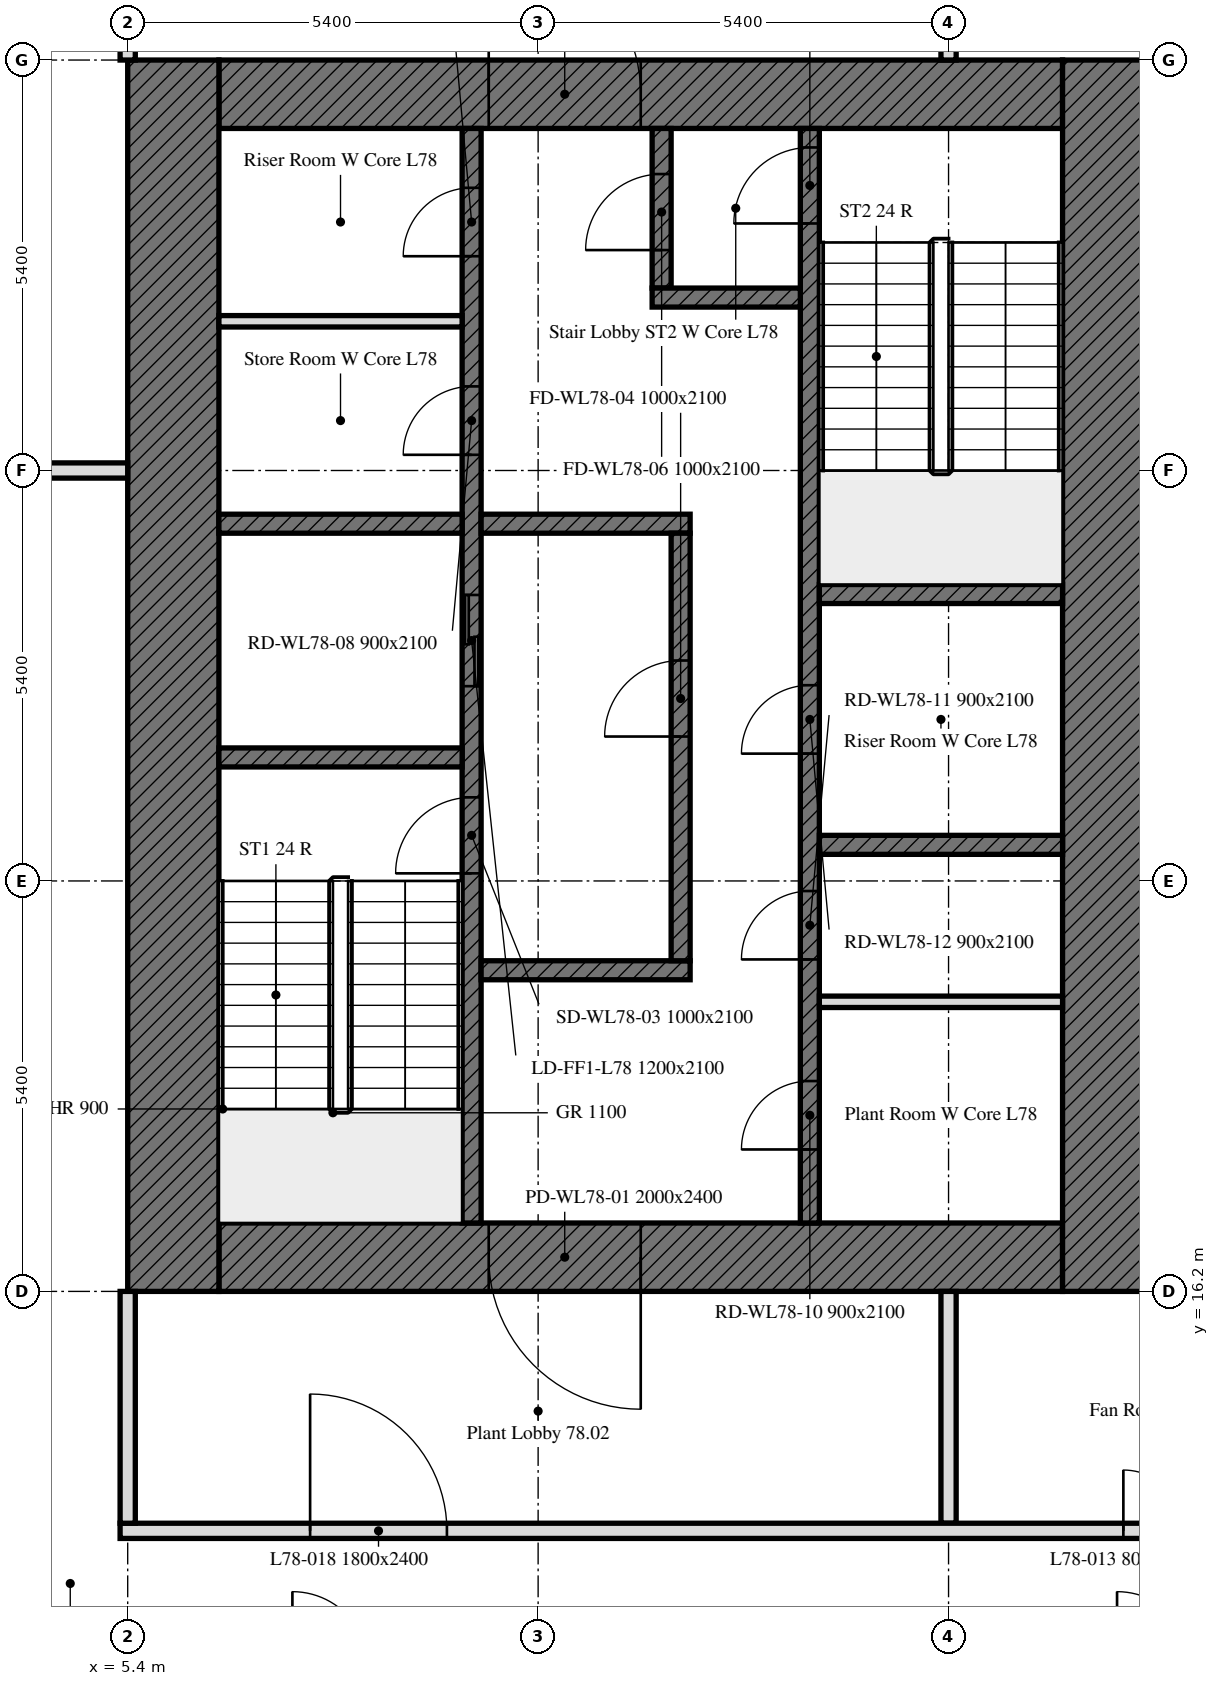
"""IFC4 building model, lengths in metres.
Left out: names, types, materials, properties, quantities, classifications, styles, units other than length and angle.
Written with IfcOpenShell. Run it as: python <this file> out.ifc"""

import sys

from ifc_helpers import new_model, si_unit, direction, frame, frame_2d, origin, place, context, subcontext, project, spatial, rectangle, extrude, element, fill, save


model = new_model("IFC4")
c1 = context("Model", 3, precision=1e-05, world=origin(), true_north=direction((0.0, 1.0)))
c2 = subcontext(c1, "Body", "Model", "MODEL_VIEW")
j1 = project(units=[si_unit("LENGTHUNIT", "METRE"), si_unit("PLANEANGLEUNIT", "RADIAN")], contexts=[c1])
p1 = place(None, origin())
s1 = spatial("IfcSite", under=j1, at=p1, CompositionType="ELEMENT")
p2 = place(p1, origin())
s2 = spatial("IfcBuilding", under=s1, at=p2, CompositionType="ELEMENT")
p3 = place(p2, frame((0.0, 0.0, 312.7)))
s3 = spatial("IfcBuildingStorey", under=s2, at=p3, CompositionType="ELEMENT", Elevation=312.7)
p4 = place(p3, frame((17.7, 16.65, 0.0), z_axis=(0.0, 0.0, 1.0), x_axis=(-1.0, 0.0, 0.0)))
e1 = element("IfcWall", 1, at=p4, inside=s3, PredefinedType="SOLIDWALL", context=c2, shape_type="SweptSolid", body=[
    extrude(rectangle(XDim=11.1, YDim=0.9, at=frame_2d((5.55, 0.0))), origin(), (0.0, 0.0, 1.0), 4.2),
])
p5 = place(p4, frame((5.55, 0.0, 0.0)))
e2 = element("IfcOpeningElement", 2, at=p5, cuts=e1, PredefinedType="OPENING", context=c2, shape_type="SweptSolid", body=[
    extrude(rectangle(XDim=2.0, YDim=2.4, at=frame_2d((1.0, 1.2))), frame((0.0, 0.45, 0.0), z_axis=(0.0, -1.0, 0.0), x_axis=(1.0, 0.0, 0.0)), (0.0, 0.0, 1.0), 0.9),
])
p6 = place(p3, frame((6.6, 31.95, 0.0), z_axis=(0.0, 0.0, 1.0), x_axis=(1.0, 0.0, 0.0)))
e3 = element("IfcWall", 3, at=p6, inside=s3, PredefinedType="SOLIDWALL", context=c2, shape_type="SweptSolid", body=[
    extrude(rectangle(XDim=11.1, YDim=0.9, at=frame_2d((5.55, 0.0))), origin(), (0.0, 0.0, 1.0), 4.2),
])
p7 = place(p6, frame((3.55, 0.0, 0.0)))
e4 = element("IfcOpeningElement", 4, at=p7, cuts=e3, PredefinedType="OPENING", context=c2, shape_type="SweptSolid", body=[
    extrude(rectangle(XDim=2.0, YDim=2.4, at=frame_2d((1.0, 1.2))), frame((0.0, 0.45, 0.0), z_axis=(0.0, -1.0, 0.0), x_axis=(1.0, 0.0, 0.0)), (0.0, 0.0, 1.0), 0.9),
])
for number, where, z_axis, x_axis in (
    (5, (6.0, 16.2, 0.0), (0.0, 0.0, 1.0), (0.0, 1.0, 0.0)),
    (6, (18.3, 32.4, 0.0), (0.0, 0.0, 1.0), (0.0, -1.0, 0.0)),
):
    element("IfcWall", number, at=place(p3, frame(where, z_axis=z_axis, x_axis=x_axis)), inside=s3, PredefinedType="SOLIDWALL", context=c2, shape_type="SweptSolid", body=[
        extrude(rectangle(XDim=16.2, YDim=1.2, at=frame_2d((8.1, 0.0))), origin(), (0.0, 0.0, 1.0), 4.2),
    ])
p8 = place(p3, frame((9.925, 17.1, 0.0), z_axis=(0.0, 0.0, 1.0), x_axis=(0.0, 1.0, 0.0)))
e7 = element("IfcWall", 7, at=p8, inside=s3, PredefinedType="SOLIDWALL", context=c2, shape_type="SweptSolid", body=[
    extrude(rectangle(XDim=14.4, YDim=0.25, at=frame_2d((7.2, 0.0))), origin(), (0.0, 0.0, 1.0), 4.2),
])
p9 = place(p8, frame((4.6, 0.0, 0.0)))
e8 = element("IfcOpeningElement", 8, at=p9, cuts=e7, PredefinedType="OPENING", context=c2, shape_type="SweptSolid", body=[
    extrude(rectangle(XDim=1.0, YDim=2.1, at=frame_2d((0.5, 1.05))), frame((0.0, 0.125, 0.0), z_axis=(0.0, -1.0, 0.0), x_axis=(1.0, 0.0, 0.0)), (0.0, 0.0, 1.0), 0.25),
])
p10 = place(p8, frame((7.062, 0.0, 0.0)))
e9 = element("IfcOpeningElement", 9, at=p10, cuts=e7, PredefinedType="OPENING", context=c2, shape_type="SweptSolid", body=[
    extrude(rectangle(XDim=1.2, YDim=2.1, at=frame_2d((0.6, 1.05))), frame((0.0, 0.125, 0.0), z_axis=(0.0, -1.0, 0.0), x_axis=(1.0, 0.0, 0.0)), (0.0, 0.0, 1.0), 0.25),
])
p11 = place(p8, frame((10.106, 0.0, 0.0)))
e10 = element("IfcOpeningElement", 10, at=p11, cuts=e7, PredefinedType="OPENING", context=c2, shape_type="SweptSolid", body=[
    extrude(rectangle(XDim=0.9, YDim=2.1, at=frame_2d((0.45, 1.05))), frame((0.0, 0.125, 0.0), z_axis=(0.0, -1.0, 0.0), x_axis=(1.0, 0.0, 0.0)), (0.0, 0.0, 1.0), 0.25),
])
p12 = place(p8, frame((12.719, 0.0, 0.0)))
e11 = element("IfcOpeningElement", 11, at=p12, cuts=e7, PredefinedType="OPENING", context=c2, shape_type="SweptSolid", body=[
    extrude(rectangle(XDim=0.9, YDim=2.1, at=frame_2d((0.45, 1.05))), frame((0.0, 0.125, 0.0), z_axis=(0.0, -1.0, 0.0), x_axis=(1.0, 0.0, 0.0)), (0.0, 0.0, 1.0), 0.25),
])
p13 = place(p3, frame((14.375, 17.1, 0.0), z_axis=(0.0, 0.0, 1.0), x_axis=(0.0, 1.0, 0.0)))
e12 = element("IfcWall", 12, at=p13, inside=s3, PredefinedType="SOLIDWALL", context=c2, shape_type="SweptSolid", body=[
    extrude(rectangle(XDim=14.4, YDim=0.25, at=frame_2d((7.2, 0.0))), origin(), (0.0, 0.0, 1.0), 4.2),
])
p14 = place(p13, frame((13.15, 0.0, 0.0)))
e13 = element("IfcOpeningElement", 13, at=p14, cuts=e12, PredefinedType="OPENING", context=c2, shape_type="SweptSolid", body=[
    extrude(rectangle(XDim=1.0, YDim=2.1, at=frame_2d((0.5, 1.05))), frame((0.0, 0.125, 0.0), z_axis=(0.0, -1.0, 0.0), x_axis=(1.0, 0.0, 0.0)), (0.0, 0.0, 1.0), 0.25),
])
p15 = place(p13, frame((0.968, 0.0, 0.0)))
e14 = element("IfcOpeningElement", 14, at=p15, cuts=e12, PredefinedType="OPENING", context=c2, shape_type="SweptSolid", body=[
    extrude(rectangle(XDim=0.9, YDim=2.1, at=frame_2d((0.45, 1.05))), frame((0.0, 0.125, 0.0), z_axis=(0.0, -1.0, 0.0), x_axis=(1.0, 0.0, 0.0)), (0.0, 0.0, 1.0), 0.25),
])
p16 = place(p13, frame((3.468, 0.0, 0.0)))
e15 = element("IfcOpeningElement", 15, at=p16, cuts=e12, PredefinedType="OPENING", context=c2, shape_type="SweptSolid", body=[
    extrude(rectangle(XDim=0.9, YDim=2.1, at=frame_2d((0.45, 1.05))), frame((0.0, 0.125, 0.0), z_axis=(0.0, -1.0, 0.0), x_axis=(1.0, 0.0, 0.0)), (0.0, 0.0, 1.0), 0.25),
])
p17 = place(p13, frame((6.175, 0.0, 0.0)))
e16 = element("IfcOpeningElement", 16, at=p17, cuts=e12, PredefinedType="OPENING", context=c2, shape_type="SweptSolid", body=[
    extrude(rectangle(XDim=0.9, YDim=2.1, at=frame_2d((0.45, 1.05))), frame((0.0, 0.125, 0.0), z_axis=(0.0, -1.0, 0.0), x_axis=(1.0, 0.0, 0.0)), (0.0, 0.0, 1.0), 0.25),
])
for number, where, z_axis, x_axis in (
    (17, (6.6, 23.225, 0.0), (0.0, 0.0, 1.0), (1.0, 0.0, 0.0)),
    (18, (14.5, 25.375, 0.0), (0.0, 0.0, 1.0), (1.0, 0.0, 0.0)),
    (19, (14.5, 22.075, 0.0), (0.0, 0.0, 1.0), (1.0, 0.0, 0.0)),
    (20, (6.6, 26.3, 0.0), (0.0, 0.0, 1.0), (1.0, 0.0, 0.0)),
):
    element("IfcWall", number, at=place(p3, frame(where, z_axis=z_axis, x_axis=x_axis)), inside=s3, PredefinedType="SOLIDWALL", context=c2, shape_type="SweptSolid", body=[
        extrude(rectangle(XDim=3.2, YDim=0.25, at=frame_2d((1.6, 0.0))), origin(), (0.0, 0.0, 1.0), 4.2),
    ])
for number, where, z_axis, x_axis in (
    (21, (10.05, 26.3, 0.0), (0.0, 0.0, 1.0), (1.0, 0.0, 0.0)),
    (22, (10.05, 20.425, 0.0), (0.0, 0.0, 1.0), (1.0, 0.0, 0.0)),
):
    element("IfcWall", number, at=place(p3, frame(where, z_axis=z_axis, x_axis=x_axis)), inside=s3, PredefinedType="SOLIDWALL", context=c2, shape_type="SweptSolid", body=[
        extrude(rectangle(XDim=2.75, YDim=0.25, at=frame_2d((1.375, 0.0))), origin(), (0.0, 0.0, 1.0), 4.2),
    ])
p18 = place(p3, frame((12.425, 29.4, 0.0), z_axis=(0.0, 0.0, 1.0), x_axis=(0.0, 1.0, 0.0)))
e23 = element("IfcWall", 23, at=p18, inside=s3, PredefinedType="SOLIDWALL", context=c2, shape_type="SweptSolid", body=[
    extrude(rectangle(XDim=2.1, YDim=0.25, at=frame_2d((1.05, 0.0))), origin(), (0.0, 0.0, 1.0), 4.2),
])
p19 = place(p18, frame((0.5, 0.0, 0.0)))
e24 = element("IfcOpeningElement", 24, at=p19, cuts=e23, PredefinedType="OPENING", context=c2, shape_type="SweptSolid", body=[
    extrude(rectangle(XDim=1.0, YDim=2.1, at=frame_2d((0.5, 1.05))), frame((0.0, 0.125, 0.0), z_axis=(0.0, -1.0, 0.0), x_axis=(1.0, 0.0, 0.0)), (0.0, 0.0, 1.0), 0.25),
])
p20 = place(p3, frame((12.3, 29.275, 0.0), z_axis=(0.0, 0.0, 1.0), x_axis=(1.0, 0.0, 0.0)))
e25 = element("IfcWall", 25, at=p20, inside=s3, PredefinedType="SOLIDWALL", context=c2, shape_type="SweptSolid", body=[
    extrude(rectangle(XDim=1.95, YDim=0.25, at=frame_2d((0.975, 0.0))), origin(), (0.0, 0.0, 1.0), 4.2),
])
p21 = place(p3, frame((12.675, 20.55, 0.0), z_axis=(0.0, 0.0, 1.0), x_axis=(0.0, 1.0, 0.0)))
e26 = element("IfcWall", 26, at=p21, inside=s3, PredefinedType="SOLIDWALL", context=c2, shape_type="SweptSolid", body=[
    extrude(rectangle(XDim=5.625, YDim=0.25, at=frame_2d((2.812, 0.0))), origin(), (0.0, 0.0, 1.0), 4.2),
])
p22 = place(p21, frame((2.95, 0.0, 0.0)))
e27 = element("IfcOpeningElement", 27, at=p22, cuts=e26, PredefinedType="OPENING", context=c2, shape_type="SweptSolid", body=[
    extrude(rectangle(XDim=1.0, YDim=2.1, at=frame_2d((0.5, 1.05))), frame((0.0, 0.125, 0.0), z_axis=(0.0, -1.0, 0.0), x_axis=(1.0, 0.0, 0.0)), (0.0, 0.0, 1.0), 0.25),
])
for number, where, z_axis, x_axis in (
    (28, (6.6, 28.963, 0.0), (0.0, 0.0, 1.0), (1.0, 0.0, 0.0)),
    (29, (14.5, 20.01, 0.0), (0.0, 0.0, 1.0), (1.0, 0.0, 0.0)),
):
    element("IfcWall", number, at=place(p3, frame(where, z_axis=z_axis, x_axis=x_axis)), inside=s3, PredefinedType="PARTITIONING", context=c2, shape_type="SweptSolid", body=[
        extrude(rectangle(XDim=3.2, YDim=0.15, at=frame_2d((1.6, 0.0))), origin(), (0.0, 0.0, 1.0), 4.2),
    ])
p23 = place(p3, frame((16.2, 37.505, 0.0), z_axis=(0.0, 0.0, 1.0), x_axis=(0.0, -1.0, 0.0)))
e30 = element("IfcWall", 30, at=p23, inside=s3, PredefinedType="PARTITIONING", context=c2, shape_type="SweptSolid", body=[
    extrude(rectangle(XDim=5.105, YDim=0.2, at=frame_2d((2.552, 0.0))), origin(), (0.0, 0.0, 1.0), 3.45),
])
p24 = place(p3, frame((5.4, 37.505, 0.0), z_axis=(0.0, 0.0, 1.0), x_axis=(0.0, -1.0, 0.0)))
e31 = element("IfcWall", 31, at=p24, inside=s3, PredefinedType="PARTITIONING", context=c2, shape_type="SweptSolid", body=[
    extrude(rectangle(XDim=5.105, YDim=0.2, at=frame_2d((2.552, 0.0))), origin(), (0.0, 0.0, 1.0), 4.2),
])
p25 = place(p3, frame((3.7, 27.0, 0.0), z_axis=(0.0, 0.0, 1.0), x_axis=(1.0, 0.0, 0.0)))
e32 = element("IfcWall", 32, at=p25, inside=s3, PredefinedType="PARTITIONING", context=c2, shape_type="SweptSolid", body=[
    extrude(rectangle(XDim=1.7, YDim=0.2, at=frame_2d((0.85, 0.0))), origin(), (0.0, 0.0, 1.0), 3.45),
])
p26 = place(p3, frame((16.2, 16.2, 0.0), z_axis=(0.0, 0.0, 1.0), x_axis=(0.0, -1.0, 0.0)))
e33 = element("IfcWall", 33, at=p26, inside=s3, PredefinedType="PARTITIONING", context=c2, shape_type="SweptSolid", body=[
    extrude(rectangle(XDim=3.05, YDim=0.2, at=frame_2d((1.525, 0.0))), origin(), (0.0, 0.0, 1.0), 4.2),
])
p27 = place(p3, frame((5.3, 13.05, 0.0), z_axis=(0.0, 0.0, 1.0), x_axis=(1.0, 0.0, 0.0)))
e34 = element("IfcWall", 34, at=p27, inside=s3, PredefinedType="PARTITIONING", context=c2, shape_type="SweptSolid", body=[
    extrude(rectangle(XDim=36.049, YDim=0.2, at=frame_2d((18.024, 0.0))), origin(), (0.0, 0.0, 1.0), 4.2),
])
p28 = place(p27, frame((23.9, 0.0, 0.0)))
e35 = element("IfcOpeningElement", 35, at=p28, cuts=e34, PredefinedType="OPENING", context=c2, shape_type="SweptSolid", body=[
    extrude(rectangle(XDim=1.0, YDim=2.1, at=frame_2d((0.5, 1.05))), frame((0.0, 0.1, 0.0), z_axis=(0.0, -1.0, 0.0), x_axis=(1.0, 0.0, 0.0)), (0.0, 0.0, 1.0), 0.2),
])
p29 = place(p27, frame((18.5, 0.0, 0.0)))
e36 = element("IfcOpeningElement", 36, at=p29, cuts=e34, PredefinedType="OPENING", context=c2, shape_type="SweptSolid", body=[
    extrude(rectangle(XDim=1.0, YDim=2.1, at=frame_2d((0.5, 1.05))), frame((0.0, 0.1, 0.0), z_axis=(0.0, -1.0, 0.0), x_axis=(1.0, 0.0, 0.0)), (0.0, 0.0, 1.0), 0.2),
])
p30 = place(p27, frame((13.2, 0.0, 0.0)))
e37 = element("IfcOpeningElement", 37, at=p30, cuts=e34, PredefinedType="OPENING", context=c2, shape_type="SweptSolid", body=[
    extrude(rectangle(XDim=0.8, YDim=2.1, at=frame_2d((0.4, 1.05))), frame((0.0, 0.1, 0.0), z_axis=(0.0, -1.0, 0.0), x_axis=(1.0, 0.0, 0.0)), (0.0, 0.0, 1.0), 0.2),
])
p31 = place(p27, frame((29.5, 0.0, 0.0)))
e38 = element("IfcOpeningElement", 38, at=p31, cuts=e34, PredefinedType="OPENING", context=c2, shape_type="SweptSolid", body=[
    extrude(rectangle(XDim=1.8, YDim=2.4, at=frame_2d((0.9, 1.2))), frame((0.0, 0.1, 0.0), z_axis=(0.0, -1.0, 0.0), x_axis=(1.0, 0.0, 0.0)), (0.0, 0.0, 1.0), 0.2),
])
p32 = place(p27, frame((2.5, 0.0, 0.0)))
e39 = element("IfcOpeningElement", 39, at=p32, cuts=e34, PredefinedType="OPENING", context=c2, shape_type="SweptSolid", body=[
    extrude(rectangle(XDim=1.8, YDim=2.4, at=frame_2d((0.9, 1.2))), frame((0.0, 0.1, 0.0), z_axis=(0.0, -1.0, 0.0), x_axis=(1.0, 0.0, 0.0)), (0.0, 0.0, 1.0), 0.2),
])
p33 = place(p3, frame((5.4, 16.2, 0.0), z_axis=(0.0, 0.0, 1.0), x_axis=(0.0, -1.0, 0.0)))
e40 = element("IfcWall", 40, at=p33, inside=s3, PredefinedType="PARTITIONING", context=c2, shape_type="SweptSolid", body=[
    extrude(rectangle(XDim=3.05, YDim=0.2, at=frame_2d((1.525, 0.0))), origin(), (0.0, 0.0, 1.0), 4.2),
])
p34 = place(p5, origin())
e41 = element("IfcDoor", 41, at=p34, inside=s3, OperationType="DOUBLE_DOOR_SINGLE_SWING", PredefinedType="DOOR", context=c2, shape_type="SweptSolid", body=[
    extrude(rectangle(XDim=2.0, YDim=2.4, at=frame_2d((1.0, 1.2))), frame((0.0, 0.025, 0.0), z_axis=(0.0, -1.0, 0.0), x_axis=(1.0, 0.0, 0.0)), (0.0, 0.0, 1.0), 0.05),
])
fill(e2, e41)
p35 = place(p7, origin())
e42 = element("IfcDoor", 42, at=p35, inside=s3, OperationType="DOUBLE_DOOR_SINGLE_SWING", PredefinedType="DOOR", context=c2, shape_type="SweptSolid", body=[
    extrude(rectangle(XDim=2.0, YDim=2.4, at=frame_2d((1.0, 1.2))), frame((0.0, 0.025, 0.0), z_axis=(0.0, -1.0, 0.0), x_axis=(1.0, 0.0, 0.0)), (0.0, 0.0, 1.0), 0.05),
])
fill(e4, e42)
p36 = place(p9, origin())
e43 = element("IfcDoor", 43, at=p36, inside=s3, OperationType="SINGLE_SWING_LEFT", PredefinedType="DOOR", context=c2, shape_type="SweptSolid", body=[
    extrude(rectangle(XDim=1.0, YDim=2.1, at=frame_2d((0.5, 1.05))), frame((0.0, 0.025, 0.0), z_axis=(0.0, -1.0, 0.0), x_axis=(1.0, 0.0, 0.0)), (0.0, 0.0, 1.0), 0.05),
])
fill(e8, e43)
p37 = place(p22, origin())
e44 = element("IfcDoor", 44, at=p37, inside=s3, OperationType="SINGLE_SWING_LEFT", PredefinedType="DOOR", context=c2, shape_type="SweptSolid", body=[
    extrude(rectangle(XDim=1.0, YDim=2.1, at=frame_2d((0.5, 1.05))), frame((0.0, 0.025, 0.0), z_axis=(0.0, -1.0, 0.0), x_axis=(1.0, 0.0, 0.0)), (0.0, 0.0, 1.0), 0.05),
])
fill(e27, e44)
p38 = place(p14, origin())
e45 = element("IfcDoor", 45, at=p38, inside=s3, OperationType="SINGLE_SWING_LEFT", PredefinedType="DOOR", context=c2, shape_type="SweptSolid", body=[
    extrude(rectangle(XDim=1.0, YDim=2.1, at=frame_2d((0.5, 1.05))), frame((0.0, 0.025, 0.0), z_axis=(0.0, -1.0, 0.0), x_axis=(1.0, 0.0, 0.0)), (0.0, 0.0, 1.0), 0.05),
])
fill(e13, e45)
p39 = place(p19, origin())
e46 = element("IfcDoor", 46, at=p39, inside=s3, OperationType="SINGLE_SWING_LEFT", PredefinedType="DOOR", context=c2, shape_type="SweptSolid", body=[
    extrude(rectangle(XDim=1.0, YDim=2.1, at=frame_2d((0.5, 1.05))), frame((0.0, 0.025, 0.0), z_axis=(0.0, -1.0, 0.0), x_axis=(1.0, 0.0, 0.0)), (0.0, 0.0, 1.0), 0.05),
])
fill(e24, e46)
p40 = place(p10, origin())
e47 = element("IfcDoor", 47, at=p40, inside=s3, OperationType="DOUBLE_DOOR_SLIDING", PredefinedType="DOOR", context=c2, shape_type="SweptSolid", body=[
    extrude(rectangle(XDim=1.2, YDim=2.1, at=frame_2d((0.6, 1.05))), frame((0.0, 0.025, 0.0), z_axis=(0.0, -1.0, 0.0), x_axis=(1.0, 0.0, 0.0)), (0.0, 0.0, 1.0), 0.05),
])
fill(e9, e47)
p41 = place(p11, origin())
e48 = element("IfcDoor", 48, at=p41, inside=s3, OperationType="SINGLE_SWING_LEFT", PredefinedType="DOOR", context=c2, shape_type="SweptSolid", body=[
    extrude(rectangle(XDim=0.9, YDim=2.1, at=frame_2d((0.45, 1.05))), frame((0.0, 0.025, 0.0), z_axis=(0.0, -1.0, 0.0), x_axis=(1.0, 0.0, 0.0)), (0.0, 0.0, 1.0), 0.05),
])
fill(e10, e48)
p42 = place(p12, origin())
e49 = element("IfcDoor", 49, at=p42, inside=s3, OperationType="SINGLE_SWING_LEFT", PredefinedType="DOOR", context=c2, shape_type="SweptSolid", body=[
    extrude(rectangle(XDim=0.9, YDim=2.1, at=frame_2d((0.45, 1.05))), frame((0.0, 0.025, 0.0), z_axis=(0.0, -1.0, 0.0), x_axis=(1.0, 0.0, 0.0)), (0.0, 0.0, 1.0), 0.05),
])
fill(e11, e49)
p43 = place(p15, origin())
e50 = element("IfcDoor", 50, at=p43, inside=s3, OperationType="SINGLE_SWING_LEFT", PredefinedType="DOOR", context=c2, shape_type="SweptSolid", body=[
    extrude(rectangle(XDim=0.9, YDim=2.1, at=frame_2d((0.45, 1.05))), frame((0.0, 0.025, 0.0), z_axis=(0.0, -1.0, 0.0), x_axis=(1.0, 0.0, 0.0)), (0.0, 0.0, 1.0), 0.05),
])
fill(e14, e50)
p44 = place(p16, origin())
e51 = element("IfcDoor", 51, at=p44, inside=s3, OperationType="SINGLE_SWING_LEFT", PredefinedType="DOOR", context=c2, shape_type="SweptSolid", body=[
    extrude(rectangle(XDim=0.9, YDim=2.1, at=frame_2d((0.45, 1.05))), frame((0.0, 0.025, 0.0), z_axis=(0.0, -1.0, 0.0), x_axis=(1.0, 0.0, 0.0)), (0.0, 0.0, 1.0), 0.05),
])
fill(e15, e51)
p45 = place(p17, origin())
e52 = element("IfcDoor", 52, at=p45, inside=s3, OperationType="SINGLE_SWING_LEFT", PredefinedType="DOOR", context=c2, shape_type="SweptSolid", body=[
    extrude(rectangle(XDim=0.9, YDim=2.1, at=frame_2d((0.45, 1.05))), frame((0.0, 0.025, 0.0), z_axis=(0.0, -1.0, 0.0), x_axis=(1.0, 0.0, 0.0)), (0.0, 0.0, 1.0), 0.05),
])
fill(e16, e52)
p46 = place(p30, origin())
e53 = element("IfcDoor", 53, at=p46, inside=s3, OperationType="SINGLE_SWING_RIGHT", PredefinedType="DOOR", context=c2, shape_type="SweptSolid", body=[
    extrude(rectangle(XDim=0.8, YDim=2.1, at=frame_2d((0.4, 1.05))), frame((0.0, 0.025, 0.0), z_axis=(0.0, -1.0, 0.0), x_axis=(1.0, 0.0, 0.0)), (0.0, 0.0, 1.0), 0.05),
])
fill(e37, e53)
p47 = place(p32, origin())
e54 = element("IfcDoor", 54, at=p47, inside=s3, OperationType="DOUBLE_DOOR_SINGLE_SWING", PredefinedType="DOOR", context=c2, shape_type="SweptSolid", body=[
    extrude(rectangle(XDim=1.8, YDim=2.4, at=frame_2d((0.9, 1.2))), frame((0.0, 0.025, 0.0), z_axis=(0.0, -1.0, 0.0), x_axis=(1.0, 0.0, 0.0)), (0.0, 0.0, 1.0), 0.05),
])
fill(e39, e54)
save(model, sys.argv[1])
